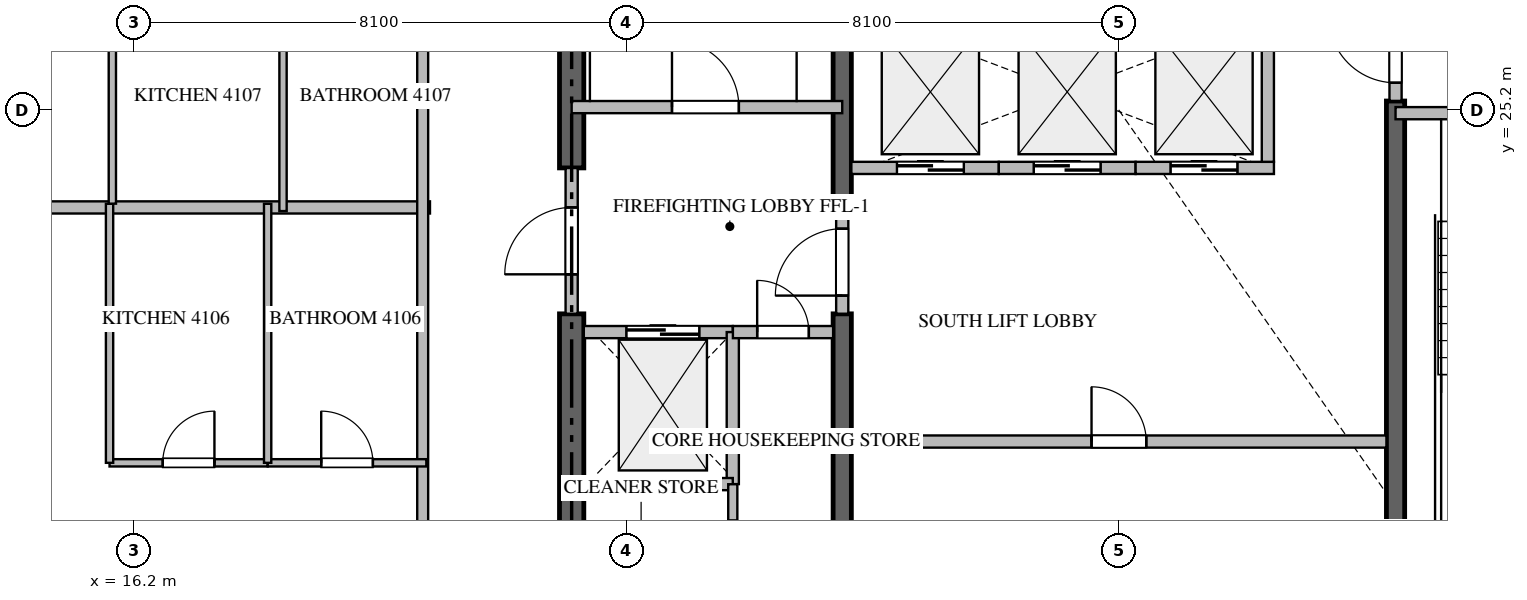
"""IFC4 building model, lengths in metres.
Left out: names, types, materials, properties, quantities, classifications, styles, units other than length and angle.
Written with IfcOpenShell. Run it as: python <this file> out.ifc"""

import sys

from ifc_helpers import new_model, si_unit, direction, frame, frame_2d, origin, place, context, subcontext, project, spatial, rectangle, extrude, source, transform, mapped, element, fill, save


model = new_model("IFC4")
c1 = context("Model", 3, precision=1e-05, world=origin(), true_north=direction((0.0, 1.0)))
c2 = subcontext(c1, "Body", "Model", "MODEL_VIEW")
j1 = project(units=[si_unit("LENGTHUNIT", "METRE"), si_unit("PLANEANGLEUNIT", "RADIAN")], contexts=[c1])
p1 = place(None, origin())
s1 = spatial("IfcSite", under=j1, at=p1, CompositionType="ELEMENT")
p2 = place(p1, origin())
s2 = spatial("IfcBuilding", under=s1, at=p2, CompositionType="ELEMENT")
p3 = place(p2, frame((0.0, 0.0, 165.15)))
s3 = spatial("IfcBuildingStorey", under=s2, at=p3, CompositionType="ELEMENT", Elevation=165.15)
p4 = place(p3, frame((23.4, 17.0, -0.26), z_axis=(0.0, 0.0, 1.0), x_axis=(0.0, 1.0, 0.0)))
e1 = element("IfcWall", 1, at=p4, inside=s3, PredefinedType="SHEAR", context=c2, shape_type="SweptSolid", body=[
    extrude(rectangle(XDim=4.85, YDim=0.4, at=frame_2d((2.425, 0.0))), origin(), (0.0, 0.0, 1.0), 3.748),
])
p5 = place(p3, frame((23.4, 24.25, -0.26), z_axis=(0.0, 0.0, 1.0), x_axis=(0.0, 1.0, 0.0)))
e2 = element("IfcWall", 2, at=p5, inside=s3, PredefinedType="SHEAR", context=c2, shape_type="SweptSolid", body=[
    extrude(rectangle(XDim=9.15, YDim=0.4, at=frame_2d((4.575, 0.0))), origin(), (0.0, 0.0, 1.0), 3.748),
])
p6 = place(p3, frame((27.85, 17.0, -0.26), z_axis=(0.0, 0.0, 1.0), x_axis=(0.0, 1.0, 0.0)))
e3 = element("IfcWall", 3, at=p6, inside=s3, PredefinedType="SHEAR", context=c2, shape_type="SweptSolid", body=[
    extrude(rectangle(XDim=4.85, YDim=0.3, at=frame_2d((2.425, 0.0))), origin(), (0.0, 0.0, 1.0), 3.748),
])
p7 = place(p3, frame((27.85, 23.55, -0.26), z_axis=(0.0, 0.0, 1.0), x_axis=(0.0, 1.0, 0.0)))
e4 = element("IfcWall", 4, at=p7, inside=s3, PredefinedType="SHEAR", context=c2, shape_type="SweptSolid", body=[
    extrude(rectangle(XDim=9.85, YDim=0.3, at=frame_2d((4.925, 0.0))), origin(), (0.0, 0.0, 1.0), 3.748),
])
p8 = place(p3, frame((36.95, 17.0, -0.26), z_axis=(0.0, 0.0, 1.0), x_axis=(0.0, 1.0, 0.0)))
e5 = element("IfcWall", 5, at=p8, inside=s3, PredefinedType="SHEAR", context=c2, shape_type="SweptSolid", body=[
    extrude(rectangle(XDim=8.35, YDim=0.3, at=frame_2d((4.175, 0.0))), origin(), (0.0, 0.0, 1.0), 3.748),
])
p9 = place(p3, frame((23.4, 25.25, 0.0), z_axis=(0.0, 0.0, 1.0), x_axis=(1.0, 0.0, 0.0)))
e6 = element("IfcWall", 6, at=p9, inside=s3, PredefinedType="STANDARD", context=c2, shape_type="SweptSolid", body=[
    extrude(rectangle(XDim=4.45, YDim=0.2, at=frame_2d((2.225, 0.0))), origin(), (0.0, 0.0, 1.0), 3.49),
])
p10 = place(p9, frame((1.65, 0.0, 0.0)))
e7 = element("IfcOpeningElement", 7, at=p10, cuts=e6, PredefinedType="OPENING", context=c2, shape_type="SweptSolid", body=[
    extrude(rectangle(XDim=1.1, YDim=2.15, at=frame_2d((0.55, 1.075))), frame((0.0, 0.11, 0.0), z_axis=(0.0, -1.0, 0.0), x_axis=(1.0, 0.0, 0.0)), (0.0, 0.0, 1.0), 0.22),
])
p11 = place(p3, frame((36.95, 25.15, 0.0), z_axis=(0.0, 0.0, 1.0), x_axis=(1.0, 0.0, 0.0)))
e8 = element("IfcWall", 8, at=p11, inside=s3, PredefinedType="STANDARD", context=c2, shape_type="SweptSolid", body=[
    extrude(rectangle(XDim=4.45, YDim=0.2, at=frame_2d((2.225, 0.0))), origin(), (0.0, 0.0, 1.0), 3.49),
])
p12 = place(p11, frame((1.65, 0.0, 0.0)))
e9 = element("IfcOpeningElement", 9, at=p12, cuts=e8, PredefinedType="OPENING", context=c2, shape_type="SweptSolid", body=[
    extrude(rectangle(XDim=1.1, YDim=2.15, at=frame_2d((0.55, 1.075))), frame((0.0, 0.11, 0.0), z_axis=(0.0, -1.0, 0.0), x_axis=(1.0, 0.0, 0.0)), (0.0, 0.0, 1.0), 0.22),
])
p13 = place(p3, frame((23.6, 21.55, 0.0), z_axis=(0.0, 0.0, 1.0), x_axis=(1.0, 0.0, 0.0)))
e10 = element("IfcWall", 10, at=p13, inside=s3, PredefinedType="STANDARD", context=c2, shape_type="SweptSolid", body=[
    extrude(rectangle(XDim=2.45, YDim=0.2, at=frame_2d((1.225, 0.0))), origin(), (0.0, 0.0, 1.0), 3.49),
])
p14 = place(p13, frame((0.7, 0.0, 0.0)))
e11 = element("IfcOpeningElement", 11, at=p14, cuts=e10, PredefinedType="OPENING", context=c2, shape_type="SweptSolid", body=[
    extrude(rectangle(XDim=1.2, YDim=2.2, at=frame_2d((0.6, 1.1))), frame((0.0, 0.11, 0.0), z_axis=(0.0, -1.0, 0.0), x_axis=(1.0, 0.0, 0.0)), (0.0, 0.0, 1.0), 0.22),
])
p15 = place(p3, frame((28.0, 24.25, 0.0), z_axis=(0.0, 0.0, 1.0), x_axis=(1.0, 0.0, 0.0)))
e12 = element("IfcWall", 12, at=p15, inside=s3, PredefinedType="STANDARD", context=c2, shape_type="SweptSolid", body=[
    extrude(rectangle(XDim=2.425, YDim=0.2, at=frame_2d((1.212, 0.0))), origin(), (0.0, 0.0, 1.0), 3.49),
])
p16 = place(p15, frame((0.75, 0.0, 0.0)))
e13 = element("IfcOpeningElement", 13, at=p16, cuts=e12, PredefinedType="OPENING", context=c2, shape_type="SweptSolid", body=[
    extrude(rectangle(XDim=1.1, YDim=2.2, at=frame_2d((0.55, 1.1))), frame((0.0, 0.11, 0.0), z_axis=(0.0, -1.0, 0.0), x_axis=(1.0, 0.0, 0.0)), (0.0, 0.0, 1.0), 0.22),
])
p17 = place(p3, frame((30.425, 24.25, 0.0), z_axis=(0.0, 0.0, 1.0), x_axis=(1.0, 0.0, 0.0)))
e14 = element("IfcWall", 14, at=p17, inside=s3, PredefinedType="STANDARD", context=c2, shape_type="SweptSolid", body=[
    extrude(rectangle(XDim=2.25, YDim=0.2, at=frame_2d((1.125, 0.0))), origin(), (0.0, 0.0, 1.0), 3.49),
])
p18 = place(p17, frame((0.575, 0.0, 0.0)))
e15 = element("IfcOpeningElement", 15, at=p18, cuts=e14, PredefinedType="OPENING", context=c2, shape_type="SweptSolid", body=[
    extrude(rectangle(XDim=1.1, YDim=2.2, at=frame_2d((0.55, 1.1))), frame((0.0, 0.11, 0.0), z_axis=(0.0, -1.0, 0.0), x_axis=(1.0, 0.0, 0.0)), (0.0, 0.0, 1.0), 0.22),
])
p19 = place(p3, frame((32.675, 24.25, 0.0), z_axis=(0.0, 0.0, 1.0), x_axis=(1.0, 0.0, 0.0)))
e16 = element("IfcWall", 16, at=p19, inside=s3, PredefinedType="STANDARD", context=c2, shape_type="SweptSolid", body=[
    extrude(rectangle(XDim=2.275, YDim=0.2, at=frame_2d((1.137, 0.0))), origin(), (0.0, 0.0, 1.0), 3.49),
])
p20 = place(p19, frame((0.575, 0.0, 0.0)))
e17 = element("IfcOpeningElement", 17, at=p20, cuts=e16, PredefinedType="OPENING", context=c2, shape_type="SweptSolid", body=[
    extrude(rectangle(XDim=1.1, YDim=2.2, at=frame_2d((0.55, 1.1))), frame((0.0, 0.11, 0.0), z_axis=(0.0, -1.0, 0.0), x_axis=(1.0, 0.0, 0.0)), (0.0, 0.0, 1.0), 0.22),
])
for number, where, z_axis, x_axis in (
    (18, (34.85, 24.35, 0.0), (0.0, 0.0, 1.0), (0.0, 1.0, 0.0)),
    (19, (26.05, 19.05, 0.0), (0.0, 0.0, 1.0), (0.0, 1.0, 0.0)),
):
    element("IfcWall", number, at=place(p3, frame(where, z_axis=z_axis, x_axis=x_axis)), inside=s3, PredefinedType="STANDARD", context=c2, shape_type="SweptSolid", body=[
        extrude(rectangle(XDim=2.5, YDim=0.2, at=frame_2d((1.25, 0.0))), origin(), (0.0, 0.0, 1.0), 3.49),
    ])
p21 = place(p3, frame((23.6, 19.05, 0.0), z_axis=(0.0, 0.0, 1.0), x_axis=(1.0, 0.0, 0.0)))
e20 = element("IfcWall", 20, at=p21, inside=s3, PredefinedType="STANDARD", context=c2, shape_type="SweptSolid", body=[
    extrude(rectangle(XDim=2.45, YDim=0.2, at=frame_2d((1.225, 0.0))), origin(), (0.0, 0.0, 1.0), 3.49),
])
p22 = place(p3, frame((26.052, 21.55, 0.0), z_axis=(0.0, 0.0, 1.0), x_axis=(1.0, 0.0, 0.0)))
e21 = element("IfcWall", 21, at=p22, inside=s3, PredefinedType="STANDARD", context=c2, shape_type="SweptSolid", body=[
    extrude(rectangle(XDim=1.648, YDim=0.2, at=frame_2d((0.824, 0.0))), origin(), (0.0, 0.0, 1.0), 3.49),
])
p23 = place(p22, frame((0.399, 0.0, 0.0)))
e22 = element("IfcOpeningElement", 22, at=p23, cuts=e21, PredefinedType="OPENING", context=c2, shape_type="SweptSolid", body=[
    extrude(rectangle(XDim=0.85, YDim=2.1, at=frame_2d((0.425, 1.05))), frame((0.0, 0.11, 0.0), z_axis=(0.0, -1.0, 0.0), x_axis=(1.0, 0.0, 0.0)), (0.0, 0.0, 1.0), 0.22),
])
p24 = place(p3, frame((23.4, 21.852, 0.0), z_axis=(0.0, 0.0, 1.0), x_axis=(0.0, 1.0, 0.0)))
e23 = element("IfcWall", 23, at=p24, inside=s3, PredefinedType="STANDARD", context=c2, shape_type="SweptSolid", body=[
    extrude(rectangle(XDim=2.396, YDim=0.2, at=frame_2d((1.198, 0.0))), origin(), (0.0, 0.0, 1.0), 3.49),
])
p25 = place(p24, frame((0.648, 0.0, 0.0)))
e24 = element("IfcOpeningElement", 24, at=p25, cuts=e23, PredefinedType="OPENING", context=c2, shape_type="SweptSolid", body=[
    extrude(rectangle(XDim=1.1, YDim=2.15, at=frame_2d((0.55, 1.075))), frame((0.0, 0.11, 0.0), z_axis=(0.0, -1.0, 0.0), x_axis=(1.0, 0.0, 0.0)), (0.0, 0.0, 1.0), 0.22),
])
p26 = place(p3, frame((27.85, 21.852, 0.0), z_axis=(0.0, 0.0, 1.0), x_axis=(0.0, 1.0, 0.0)))
e25 = element("IfcWall", 25, at=p26, inside=s3, PredefinedType="STANDARD", context=c2, shape_type="SweptSolid", body=[
    extrude(rectangle(XDim=1.696, YDim=0.2, at=frame_2d((0.848, 0.0))), origin(), (0.0, 0.0, 1.0), 3.49),
])
p27 = place(p26, frame((0.298, 0.0, 0.0)))
e26 = element("IfcOpeningElement", 26, at=p27, cuts=e25, PredefinedType="OPENING", context=c2, shape_type="SweptSolid", body=[
    extrude(rectangle(XDim=1.1, YDim=2.15, at=frame_2d((0.55, 1.075))), frame((0.0, 0.11, 0.0), z_axis=(0.0, -1.0, 0.0), x_axis=(1.0, 0.0, 0.0)), (0.0, 0.0, 1.0), 0.22),
])
p28 = place(p3, frame((36.95, 25.352, 0.0), z_axis=(0.0, 0.0, 1.0), x_axis=(0.0, 1.0, 0.0)))
e27 = element("IfcWall", 27, at=p28, inside=s3, PredefinedType="STANDARD", context=c2, shape_type="SweptSolid", body=[
    extrude(rectangle(XDim=1.696, YDim=0.2, at=frame_2d((0.848, 0.0))), origin(), (0.0, 0.0, 1.0), 3.49),
])
p29 = place(p28, frame((0.298, 0.0, 0.0)))
e28 = element("IfcOpeningElement", 28, at=p29, cuts=e27, PredefinedType="OPENING", context=c2, shape_type="SweptSolid", body=[
    extrude(rectangle(XDim=1.1, YDim=2.15, at=frame_2d((0.55, 1.075))), frame((0.0, 0.11, 0.0), z_axis=(0.0, -1.0, 0.0), x_axis=(1.0, 0.0, 0.0)), (0.0, 0.0, 1.0), 0.22),
])
p30 = place(p3, frame((26.05, 17.0, 0.0), z_axis=(0.0, 0.0, 1.0), x_axis=(0.0, 1.0, 0.0)))
e29 = element("IfcWall", 29, at=p30, inside=s3, PredefinedType="PARTITIONING", context=c2, shape_type="SweptSolid", body=[
    extrude(rectangle(XDim=2.048, YDim=0.15, at=frame_2d((1.024, 0.0))), origin(), (0.0, 0.0, 1.0), 3.49),
])
p31 = place(p30, frame((0.599, 0.0, 0.0)))
e30 = element("IfcOpeningElement", 30, at=p31, cuts=e29, PredefinedType="OPENING", context=c2, shape_type="SweptSolid", body=[
    extrude(rectangle(XDim=0.85, YDim=2.1, at=frame_2d((0.425, 1.05))), frame((0.0, 0.085, 0.0), z_axis=(0.0, -1.0, 0.0), x_axis=(1.0, 0.0, 0.0)), (0.0, 0.0, 1.0), 0.17),
])
p32 = place(p3, frame((28.0, 19.75, 0.0), z_axis=(0.0, 0.0, 1.0), x_axis=(1.0, 0.0, 0.0)))
e31 = element("IfcWall", 31, at=p32, inside=s3, PredefinedType="STANDARD", context=c2, shape_type="SweptSolid", body=[
    extrude(rectangle(XDim=8.8, YDim=0.2, at=frame_2d((4.4, 0.0))), origin(), (0.0, 0.0, 1.0), 3.49),
])
p33 = place(p32, frame((3.95, 0.0, 0.0)))
e32 = element("IfcOpeningElement", 32, at=p33, cuts=e31, PredefinedType="OPENING", context=c2, shape_type="SweptSolid", body=[
    extrude(rectangle(XDim=0.9, YDim=2.1, at=frame_2d((0.45, 1.05))), frame((0.0, 0.11, 0.0), z_axis=(0.0, -1.0, 0.0), x_axis=(1.0, 0.0, 0.0)), (0.0, 0.0, 1.0), 0.22),
])
p34 = place(p3, frame((7.882, 23.6, 0.0), z_axis=(0.0, 0.0, 1.0), x_axis=(1.0, 0.0, 0.0)))
e33 = element("IfcWall", 33, at=p34, inside=s3, PredefinedType="PARTITIONING", context=c2, shape_type="SweptSolid", body=[
    extrude(rectangle(XDim=13.188, YDim=0.2, at=frame_2d((6.594, 0.0))), origin(), (0.0, 0.0, 1.0), 3.49),
])
p35 = place(p3, frame((20.95, 14.9, 0.0), z_axis=(0.0, 0.0, 1.0), x_axis=(0.0, 1.0, 0.0)))
e34 = element("IfcWall", 34, at=p35, inside=s3, PredefinedType="PARTITIONING", context=c2, shape_type="SweptSolid", body=[
    extrude(rectangle(XDim=18.7, YDim=0.18, at=frame_2d((9.35, 0.0))), origin(), (0.0, 0.0, 1.0), 3.49),
])
p36 = place(p35, frame((1.805, 0.0, 0.0)))
e35 = element("IfcOpeningElement", 35, at=p36, cuts=e34, PredefinedType="OPENING", context=c2, shape_type="SweptSolid", body=[
    extrude(rectangle(XDim=1.0, YDim=2.15, at=frame_2d((0.5, 1.075))), frame((0.0, 0.1, 0.0), z_axis=(0.0, -1.0, 0.0), x_axis=(1.0, 0.0, 0.0)), (0.0, 0.0, 1.0), 0.2),
])
p37 = place(p35, frame((15.257, 0.0, 0.0)))
e36 = element("IfcOpeningElement", 36, at=p37, cuts=e34, PredefinedType="OPENING", context=c2, shape_type="SweptSolid", body=[
    extrude(rectangle(XDim=1.0, YDim=2.15, at=frame_2d((0.5, 1.075))), frame((0.0, 0.1, 0.0), z_axis=(0.0, -1.0, 0.0), x_axis=(1.0, 0.0, 0.0)), (0.0, 0.0, 1.0), 0.2),
])
p38 = place(p3, frame((15.8, 19.4, 0.0), z_axis=(0.0, 0.0, 1.0), x_axis=(1.0, 0.0, 0.0)))
e37 = element("IfcWall", 37, at=p38, inside=s3, PredefinedType="PARTITIONING", context=c2, shape_type="SweptSolid", body=[
    extrude(rectangle(XDim=2.6, YDim=0.12, at=frame_2d((1.3, 0.0))), origin(), (0.0, 0.0, 1.0), 3.49),
])
p39 = place(p38, frame((0.875, 0.0, 0.0)))
e38 = element("IfcOpeningElement", 38, at=p39, cuts=e37, PredefinedType="OPENING", context=c2, shape_type="SweptSolid", body=[
    extrude(rectangle(XDim=0.85, YDim=2.1, at=frame_2d((0.425, 1.05))), frame((0.0, 0.07, 0.0), z_axis=(0.0, -1.0, 0.0), x_axis=(1.0, 0.0, 0.0)), (0.0, 0.0, 1.0), 0.14),
])
p40 = place(p3, frame((18.402, 19.4, 0.0), z_axis=(0.0, 0.0, 1.0), x_axis=(1.0, 0.0, 0.0)))
e39 = element("IfcWall", 39, at=p40, inside=s3, PredefinedType="PARTITIONING", context=c2, shape_type="SweptSolid", body=[
    extrude(rectangle(XDim=2.608, YDim=0.12, at=frame_2d((1.304, 0.0))), origin(), (0.0, 0.0, 1.0), 3.49),
])
p41 = place(p40, frame((0.879, 0.0, 0.0)))
e40 = element("IfcOpeningElement", 40, at=p41, cuts=e39, PredefinedType="OPENING", context=c2, shape_type="SweptSolid", body=[
    extrude(rectangle(XDim=0.85, YDim=2.1, at=frame_2d((0.425, 1.05))), frame((0.0, 0.07, 0.0), z_axis=(0.0, -1.0, 0.0), x_axis=(1.0, 0.0, 0.0)), (0.0, 0.0, 1.0), 0.14),
])
for number, where, z_axis, x_axis in (
    (41, (18.4, 19.4, 0.0), (0.0, 0.0, 1.0), (0.0, 1.0, 0.0)),
    (42, (15.8, 19.4, 0.0), (0.0, 0.0, 1.0), (0.0, 1.0, 0.0)),
):
    element("IfcWall", number, at=place(p3, frame(where, z_axis=z_axis, x_axis=x_axis)), inside=s3, PredefinedType="PARTITIONING", context=c2, shape_type="SweptSolid", body=[
        extrude(rectangle(XDim=4.26, YDim=0.12, at=frame_2d((2.13, 0.0))), origin(), (0.0, 0.0, 1.0), 3.49),
    ])
p42 = place(p3, frame((15.846, 23.662, 0.0), z_axis=(0.0, 0.0, 1.0), x_axis=(0.0, 1.0, 0.0)))
e43 = element("IfcWall", 43, at=p42, inside=s3, PredefinedType="PARTITIONING", context=c2, shape_type="SweptSolid", body=[
    extrude(rectangle(XDim=4.138, YDim=0.12, at=frame_2d((2.069, 0.0))), origin(), (0.0, 0.0, 1.0), 3.49),
])
p43 = place(p3, frame((18.653, 23.54, 0.0), z_axis=(0.0, 0.0, 1.0), x_axis=(0.0, 1.0, 0.0)))
e44 = element("IfcWall", 44, at=p43, inside=s3, PredefinedType="PARTITIONING", context=c2, shape_type="SweptSolid", body=[
    extrude(rectangle(XDim=4.26, YDim=0.12, at=frame_2d((2.13, 0.0))), origin(), (0.0, 0.0, 1.0), 3.49),
])
m1 = source(origin(), c2, "Body", "SweptSolid", [
    extrude(rectangle(XDim=1.1, YDim=2.15, at=frame_2d((0.55, 1.075))), frame((0.0, 0.025, 0.0), z_axis=(0.0, -1.0, 0.0), x_axis=(1.0, 0.0, 0.0)), (0.0, 0.0, 1.0), 0.05),
])
p44 = place(p10, origin())
e45 = element("IfcDoor", 45, at=p44, inside=s3, OperationType="SINGLE_SWING_LEFT", PredefinedType="DOOR", context=c2, shape_type="MappedRepresentation", body=[
    mapped(m1, transform((0.0, 0.0, 0.0), scale=1.0)),
])
fill(e7, e45)
m2 = source(origin(), c2, "Body", "SweptSolid", [
    extrude(rectangle(XDim=1.2, YDim=2.2, at=frame_2d((0.6, 1.1))), frame((0.0, 0.025, 0.0), z_axis=(0.0, -1.0, 0.0), x_axis=(1.0, 0.0, 0.0)), (0.0, 0.0, 1.0), 0.05),
])
p45 = place(p14, origin())
e46 = element("IfcDoor", 46, at=p45, inside=s3, OperationType="DOUBLE_DOOR_SLIDING", PredefinedType="DOOR", context=c2, shape_type="MappedRepresentation", body=[
    mapped(m2, transform((0.0, 0.0, 0.0), scale=1.0)),
])
fill(e11, e46)
m3 = source(origin(), c2, "Body", "SweptSolid", [
    extrude(rectangle(XDim=1.1, YDim=2.2, at=frame_2d((0.55, 1.1))), frame((0.0, 0.025, 0.0), z_axis=(0.0, -1.0, 0.0), x_axis=(1.0, 0.0, 0.0)), (0.0, 0.0, 1.0), 0.05),
])
p46 = place(p16, origin())
e47 = element("IfcDoor", 47, at=p46, inside=s3, OperationType="DOUBLE_DOOR_SLIDING", PredefinedType="DOOR", context=c2, shape_type="MappedRepresentation", body=[
    mapped(m3, transform((0.0, 0.0, 0.0), scale=1.0)),
])
fill(e13, e47)
p47 = place(p18, origin())
e48 = element("IfcDoor", 48, at=p47, inside=s3, OperationType="DOUBLE_DOOR_SLIDING", PredefinedType="DOOR", context=c2, shape_type="MappedRepresentation", body=[
    mapped(m3, transform((0.0, 0.0, 0.0), scale=1.0)),
])
fill(e15, e48)
p48 = place(p20, origin())
e49 = element("IfcDoor", 49, at=p48, inside=s3, OperationType="DOUBLE_DOOR_SLIDING", PredefinedType="DOOR", context=c2, shape_type="MappedRepresentation", body=[
    mapped(m3, transform((0.0, 0.0, 0.0), scale=1.0)),
])
fill(e17, e49)
m4 = source(origin(), c2, "Body", "SweptSolid", [
    extrude(rectangle(XDim=0.85, YDim=2.1, at=frame_2d((0.425, 1.05))), frame((0.0, 0.025, 0.0), z_axis=(0.0, -1.0, 0.0), x_axis=(1.0, 0.0, 0.0)), (0.0, 0.0, 1.0), 0.05),
])
p49 = place(p23, origin())
e50 = element("IfcDoor", 50, at=p49, inside=s3, OperationType="SINGLE_SWING_LEFT", PredefinedType="DOOR", context=c2, shape_type="MappedRepresentation", body=[
    mapped(m4, transform((0.0, 0.0, 0.0), scale=1.0)),
])
fill(e22, e50)
p50 = place(p25, origin())
e51 = element("IfcDoor", 51, at=p50, inside=s3, OperationType="SINGLE_SWING_LEFT", PredefinedType="DOOR", context=c2, shape_type="MappedRepresentation", body=[
    mapped(m1, transform((0.0, 0.0, 0.0), scale=1.0)),
])
fill(e24, e51)
p51 = place(p27, origin())
e52 = element("IfcDoor", 52, at=p51, inside=s3, OperationType="SINGLE_SWING_LEFT", PredefinedType="DOOR", context=c2, shape_type="MappedRepresentation", body=[
    mapped(m1, transform((0.0, 0.0, 0.0), scale=1.0)),
])
fill(e26, e52)
p52 = place(p29, origin())
e53 = element("IfcDoor", 53, at=p52, inside=s3, OperationType="SINGLE_SWING_RIGHT", PredefinedType="DOOR", context=c2, shape_type="MappedRepresentation", body=[
    mapped(m1, transform((0.0, 0.0, 0.0), scale=1.0)),
])
fill(e28, e53)
m5 = source(origin(), c2, "Body", "SweptSolid", [
    extrude(rectangle(XDim=0.9, YDim=2.1, at=frame_2d((0.45, 1.05))), frame((0.0, 0.025, 0.0), z_axis=(0.0, -1.0, 0.0), x_axis=(1.0, 0.0, 0.0)), (0.0, 0.0, 1.0), 0.05),
])
p53 = place(p33, origin())
e54 = element("IfcDoor", 54, at=p53, inside=s3, OperationType="SINGLE_SWING_LEFT", PredefinedType="DOOR", context=c2, shape_type="MappedRepresentation", body=[
    mapped(m5, transform((0.0, 0.0, 0.0), scale=1.0)),
])
fill(e32, e54)
p54 = place(p39, origin())
e55 = element("IfcDoor", 55, at=p54, inside=s3, OperationType="SINGLE_SWING_RIGHT", PredefinedType="DOOR", context=c2, shape_type="MappedRepresentation", body=[
    mapped(m4, transform((0.0, 0.0, 0.0), scale=1.0)),
])
fill(e38, e55)
p55 = place(p41, origin())
e56 = element("IfcDoor", 56, at=p55, inside=s3, OperationType="SINGLE_SWING_LEFT", PredefinedType="DOOR", context=c2, shape_type="MappedRepresentation", body=[
    mapped(m4, transform((0.0, 0.0, 0.0), scale=1.0)),
])
fill(e40, e56)
save(model, sys.argv[1])
